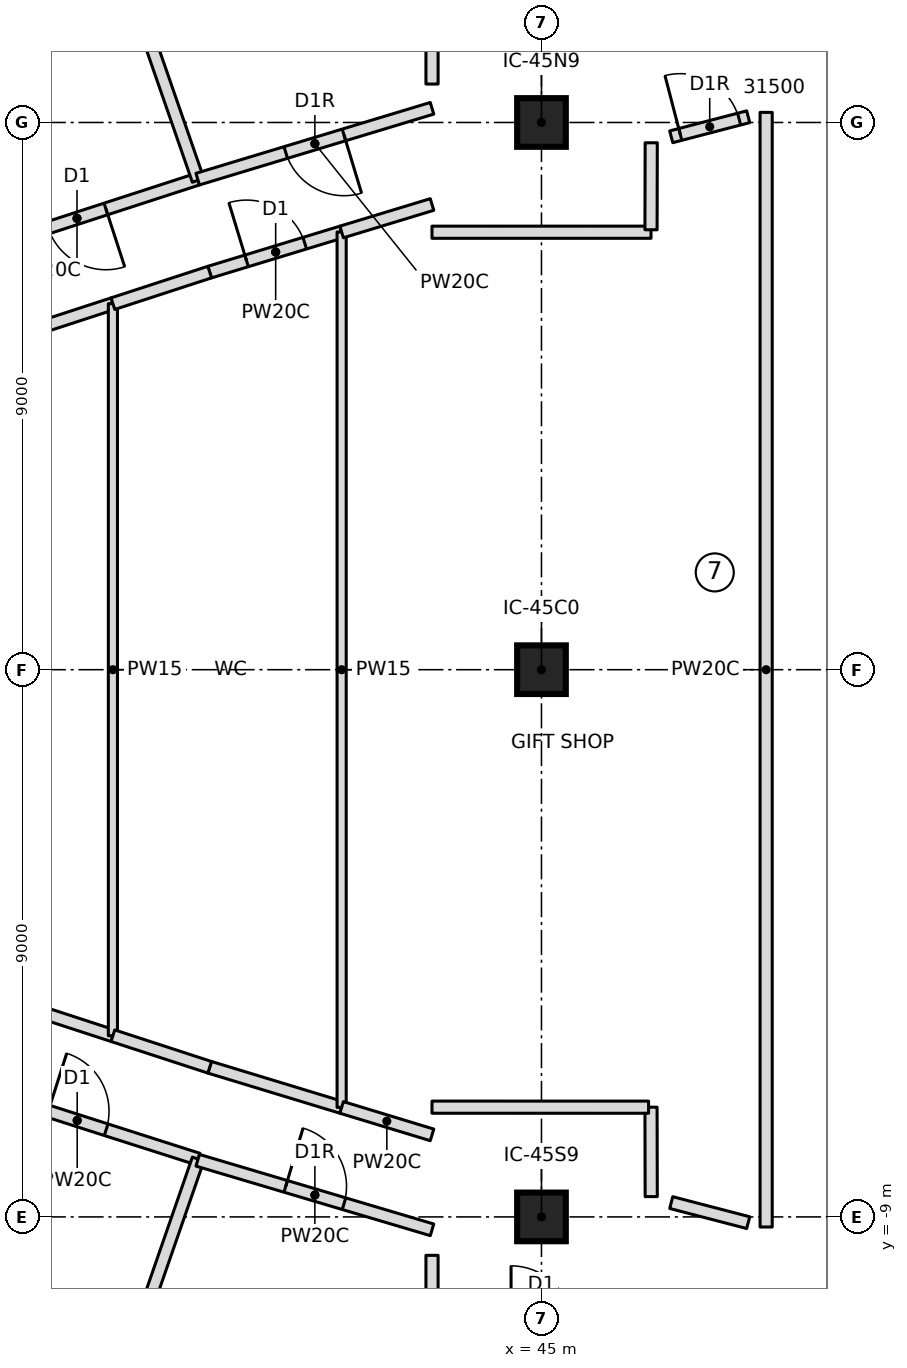
"""IFC4 building model, lengths in metres.
Left out: names, types, materials, properties, quantities, classifications, styles, units other than length and angle.
Written with IfcOpenShell. Run it as: python <this file> out.ifc"""

import sys

from ifc_helpers import new_model, si_unit, direction, frame, frame_2d, origin, origin_2d, place, context, subcontext, project, spatial, rectangle, extrude, element, fill, save


model = new_model("IFC4")
c1 = context("Model", 3, precision=1e-05, world=origin(), true_north=direction((0.0, 1.0)))
c2 = subcontext(c1, "Body", "Model", "MODEL_VIEW")
j1 = project(units=[si_unit("LENGTHUNIT", "METRE"), si_unit("PLANEANGLEUNIT", "RADIAN")], contexts=[c1])
p1 = place(None, origin())
s1 = spatial("IfcSite", under=j1, at=p1, CompositionType="ELEMENT")
p2 = place(p1, origin())
s2 = spatial("IfcBuilding", under=s1, at=p2, CompositionType="ELEMENT")
p3 = place(p2, frame((0.0, 0.0, 308.6)))
s3 = spatial("IfcBuildingStorey", under=s2, at=p3, CompositionType="ELEMENT", Elevation=308.6)
for number, where, z_axis, x_axis in (
    (1, (45.0, -9.0, 0.0), (0.0, 0.0, 1.0), (1.0, 0.0, 0.0)),
    (2, (45.0, 0.0, 0.0), (0.0, 0.0, 1.0), (1.0, 0.0, 0.0)),
    (3, (45.0, 9.0, 0.0), (0.0, 0.0, 1.0), (1.0, 0.0, 0.0)),
):
    element("IfcColumn", number, at=place(p3, frame(where, z_axis=z_axis, x_axis=x_axis)), inside=s3, PredefinedType="COLUMN", context=c2, shape_type="SweptSolid", body=[
        extrude(rectangle(XDim=0.8, YDim=0.8, at=origin_2d()), origin(), (0.0, 0.0, 1.0), 4.6),
    ])
p4 = place(p3, frame((39.347, 8.068, 0.0), z_axis=(0.0, 0.0, 1.0), x_axis=(-0.951104948213, -0.308867896493, 0.0)))
e4 = element("IfcWall", 4, at=p4, inside=s3, PredefinedType="PARTITIONING", context=c2, shape_type="SweptSolid", body=[
    extrude(rectangle(XDim=4.175, YDim=0.2, at=frame_2d((2.087, 0.0))), origin(), (0.0, 0.0, 1.0), 4.3),
])
p5 = place(p4, frame((1.588, 0.0, 0.0)))
e5 = element("IfcOpeningElement", 5, at=p5, cuts=e4, PredefinedType="OPENING", context=c2, shape_type="SweptSolid", body=[
    extrude(rectangle(XDim=1.0, YDim=2.1, at=frame_2d((0.5, 1.05))), frame((0.0, 0.11, 0.0), z_axis=(0.0, -1.0, 0.0), x_axis=(1.0, 0.0, 0.0)), (0.0, 0.0, 1.0), 0.22),
])
p6 = place(p3, frame((39.354, 8.049, 0.0), z_axis=(0.0, 0.0, 1.0), x_axis=(-0.327741126954, 0.944767565967, 0.0)))
e6 = element("IfcWall", 6, at=p6, inside=s3, PredefinedType="PARTITIONING", context=c2, shape_type="SweptSolid", body=[
    extrude(rectangle(XDim=7.606, YDim=0.2, at=frame_2d((3.803, 0.0))), origin(), (0.0, 0.0, 1.0), 4.3),
])
p7 = place(p3, frame((43.2, 9.233, 0.0), z_axis=(0.0, 0.0, 1.0), x_axis=(-0.957187982889, -0.289467036833, 0.0)))
e7 = element("IfcWall", 7, at=p7, inside=s3, PredefinedType="PARTITIONING", context=c2, shape_type="SweptSolid", body=[
    extrude(rectangle(XDim=4.026, YDim=0.2, at=frame_2d((2.013, 0.0))), origin(), (0.0, 0.0, 1.0), 4.3),
])
p8 = place(p7, frame((1.513, 0.0, 0.0)))
e8 = element("IfcOpeningElement", 8, at=p8, cuts=e7, PredefinedType="OPENING", context=c2, shape_type="SweptSolid", body=[
    extrude(rectangle(XDim=1.0, YDim=2.1, at=frame_2d((0.5, 1.05))), frame((0.0, 0.11, 0.0), z_axis=(0.0, -1.0, 0.0), x_axis=(1.0, 0.0, 0.0)), (0.0, 0.0, 1.0), 0.22),
])
p9 = place(p3, frame((35.376, -6.779, 0.0), z_axis=(0.0, 0.0, 1.0), x_axis=(0.952572699992, -0.304311109278, 0.0)))
e9 = element("IfcWall", 9, at=p9, inside=s3, PredefinedType="PARTITIONING", context=c2, shape_type="SweptSolid", body=[
    extrude(rectangle(XDim=4.176, YDim=0.2, at=frame_2d((2.088, 0.0))), origin(), (0.0, 0.0, 1.0), 4.3),
])
p10 = place(p9, frame((1.588, 0.0, 0.0)))
e10 = element("IfcOpeningElement", 10, at=p10, cuts=e9, PredefinedType="OPENING", context=c2, shape_type="SweptSolid", body=[
    extrude(rectangle(XDim=1.0, YDim=2.1, at=frame_2d((0.5, 1.05))), frame((0.0, 0.11, 0.0), z_axis=(0.0, -1.0, 0.0), x_axis=(1.0, 0.0, 0.0)), (0.0, 0.0, 1.0), 0.22),
])
p11 = place(p3, frame((36.861, -15.235, 0.0), z_axis=(0.0, 0.0, 1.0), x_axis=(0.327741126954, 0.944767565967, 0.0)))
e11 = element("IfcWall", 11, at=p11, inside=s3, PredefinedType="PARTITIONING", context=c2, shape_type="SweptSolid", body=[
    extrude(rectangle(XDim=7.606, YDim=0.2, at=frame_2d((3.803, 0.0))), origin(), (0.0, 0.0, 1.0), 4.3),
])
p12 = place(p3, frame((39.347, -8.068, 0.0), z_axis=(0.0, 0.0, 1.0), x_axis=(0.958623301067, -0.284677653938, 0.0)))
e12 = element("IfcWall", 12, at=p12, inside=s3, PredefinedType="PARTITIONING", context=c2, shape_type="SweptSolid", body=[
    extrude(rectangle(XDim=4.02, YDim=0.2, at=frame_2d((2.01, 0.0))), origin(), (0.0, 0.0, 1.0), 4.3),
])
p13 = place(p12, frame((1.51, 0.0, 0.0)))
e13 = element("IfcOpeningElement", 13, at=p13, cuts=e12, PredefinedType="OPENING", context=c2, shape_type="SweptSolid", body=[
    extrude(rectangle(XDim=1.0, YDim=2.1, at=frame_2d((0.5, 1.05))), frame((0.0, 0.11, 0.0), z_axis=(0.0, -1.0, 0.0), x_axis=(1.0, 0.0, 0.0)), (0.0, 0.0, 1.0), 0.22),
])
for number, where, z_axis, x_axis in (
    (14, (35.783, 5.313, 0.0), (0.0, 0.0, 1.0), (0.951, 0.31, 0.0)),
    (15, (37.952, -6.02, 0.0), (0.0, 0.0, 1.0), (-0.951, 0.31, 0.0)),
):
    element("IfcWall", number, at=place(p3, frame(where, z_axis=z_axis, x_axis=x_axis)), inside=s3, PredefinedType="PARTITIONING", context=c2, shape_type="SweptSolid", body=[
        extrude(rectangle(XDim=2.281, YDim=0.2, at=frame_2d((1.14, 0.0))), origin(), (0.0, 0.0, 1.0), 4.3),
    ])
p14 = place(p3, frame((37.952, -6.02, 0.0), z_axis=(0.0, 0.0, 1.0), x_axis=(0.0, 1.0, 0.0)))
e16 = element("IfcWall", 16, at=p14, inside=s3, PredefinedType="PARTITIONING", context=c2, shape_type="SweptSolid", body=[
    extrude(rectangle(XDim=12.04, YDim=0.15, at=frame_2d((6.02, 0.0))), origin(), (0.0, 0.0, 1.0), 4.3),
])
p15 = place(p3, frame((39.544, 6.539, 0.0), z_axis=(0.0, 0.0, 1.0), x_axis=(0.956735130354, 0.290960289981, 0.0)))
e17 = element("IfcWall", 17, at=p15, inside=s3, PredefinedType="PARTITIONING", context=c2, shape_type="SweptSolid", body=[
    extrude(rectangle(XDim=2.268, YDim=0.2, at=frame_2d((1.134, 0.0))), origin(), (0.0, 0.0, 1.0), 4.3),
])
p16 = place(p15, frame((0.634, 0.0, 0.0)))
e18 = element("IfcOpeningElement", 18, at=p16, cuts=e17, PredefinedType="OPENING", context=c2, shape_type="SweptSolid", body=[
    extrude(rectangle(XDim=1.0, YDim=2.1, at=frame_2d((0.5, 1.05))), frame((0.0, 0.11, 0.0), z_axis=(0.0, -1.0, 0.0), x_axis=(1.0, 0.0, 0.0)), (0.0, 0.0, 1.0), 0.22),
])
p17 = place(p3, frame((41.714, -7.199, 0.0), z_axis=(0.0, 0.0, 1.0), x_axis=(-0.956735130354, 0.290960289981, 0.0)))
e19 = element("IfcWall", 19, at=p17, inside=s3, PredefinedType="PARTITIONING", context=c2, shape_type="SweptSolid", body=[
    extrude(rectangle(XDim=2.268, YDim=0.2, at=frame_2d((1.134, 0.0))), origin(), (0.0, 0.0, 1.0), 4.3),
])
for number, where, z_axis, x_axis in (
    (20, (39.544, -6.539, 0.0), (0.0, 0.0, 1.0), (-0.951, 0.31, 0.0)),
    (21, (37.952, 6.02, 0.0), (0.0, 0.0, 1.0), (0.951, 0.31, 0.0)),
):
    element("IfcWall", number, at=place(p3, frame(where, z_axis=z_axis, x_axis=x_axis)), inside=s3, PredefinedType="PARTITIONING", context=c2, shape_type="SweptSolid", body=[
        extrude(rectangle(XDim=1.675, YDim=0.2, at=frame_2d((0.837, 0.0))), origin(), (0.0, 0.0, 1.0), 4.3),
    ])
p18 = place(p3, frame((41.714, -7.199, 0.0), z_axis=(0.0, 0.0, 1.0), x_axis=(0.0, 1.0, 0.0)))
e22 = element("IfcWall", 22, at=p18, inside=s3, PredefinedType="PARTITIONING", context=c2, shape_type="SweptSolid", body=[
    extrude(rectangle(XDim=14.398, YDim=0.15, at=frame_2d((7.199, 0.0))), origin(), (0.0, 0.0, 1.0), 4.3),
])
for number, where, z_axis, x_axis in (
    (23, (43.2, -7.651, 0.0), (0.0, 0.0, 1.0), (-0.957, 0.291, 0.0)),
    (24, (41.714, 7.199, 0.0), (0.0, 0.0, 1.0), (0.957, 0.291, 0.0)),
):
    element("IfcWall", number, at=place(p3, frame(where, z_axis=z_axis, x_axis=x_axis)), inside=s3, PredefinedType="PARTITIONING", context=c2, shape_type="SweptSolid", body=[
        extrude(rectangle(XDim=1.553, YDim=0.2, at=frame_2d((0.777, 0.0))), origin(), (0.0, 0.0, 1.0), 4.3),
    ])
p19 = place(p3, frame((47.134, 8.764, 0.0), z_axis=(0.0, 0.0, 1.0), x_axis=(0.967678694968, 0.252186326563, 0.0)))
e25 = element("IfcWall", 25, at=p19, inside=s3, PredefinedType="PARTITIONING", context=c2, shape_type="SweptSolid", body=[
    extrude(rectangle(XDim=1.308, YDim=0.2, at=frame_2d((0.654, 0.0))), origin(), (0.0, 0.0, 1.0), 4.3),
])
p20 = place(p19, frame((0.154, 0.0, 0.0)))
e26 = element("IfcOpeningElement", 26, at=p20, cuts=e25, PredefinedType="OPENING", context=c2, shape_type="SweptSolid", body=[
    extrude(rectangle(XDim=1.0, YDim=2.1, at=frame_2d((0.5, 1.05))), frame((0.0, 0.11, 0.0), z_axis=(0.0, -1.0, 0.0), x_axis=(1.0, 0.0, 0.0)), (0.0, 0.0, 1.0), 0.22),
])
p21 = place(p3, frame((48.4, -9.094, 0.0), z_axis=(0.0, 0.0, 1.0), x_axis=(-0.967678694968, 0.252186326563, 0.0)))
e27 = element("IfcWall", 27, at=p21, inside=s3, PredefinedType="PARTITIONING", context=c2, shape_type="SweptSolid", body=[
    extrude(rectangle(XDim=1.308, YDim=0.2, at=frame_2d((0.654, 0.0))), origin(), (0.0, 0.0, 1.0), 4.3),
])
p22 = place(p3, frame((43.199, 7.195, 0.0), z_axis=(0.0, 0.0, 1.0), x_axis=(0.999999997703, 6.7778229e-05, 0.0)))
e28 = element("IfcWall", 28, at=p22, inside=s3, PredefinedType="PARTITIONING", context=c2, shape_type="SweptSolid", body=[
    extrude(rectangle(XDim=3.602, YDim=0.2, at=frame_2d((1.801, 0.0))), origin(), (0.0, 0.0, 1.0), 4.3),
])
p23 = place(p3, frame((46.802, 7.235, 0.0), z_axis=(0.0, 0.0, 1.0), x_axis=(0.00238825658, 0.999997148111, 0.0)))
e29 = element("IfcWall", 29, at=p23, inside=s3, PredefinedType="PARTITIONING", context=c2, shape_type="SweptSolid", body=[
    extrude(rectangle(XDim=1.431, YDim=0.2, at=frame_2d((0.716, 0.0))), origin(), (0.0, 0.0, 1.0), 4.3),
])
p24 = place(p3, frame((48.695, 9.166, 0.0), z_axis=(0.0, 0.0, 1.0), x_axis=(0.0, -1.0, 0.0)))
e30 = element("IfcWall", 30, at=p24, inside=s3, PredefinedType="PARTITIONING", context=c2, shape_type="SweptSolid", body=[
    extrude(rectangle(XDim=18.332, YDim=0.2, at=frame_2d((9.166, 0.0))), origin(), (0.0, 0.0, 1.0), 4.3),
])
p25 = place(p3, frame((46.805, -8.666, 0.0), z_axis=(0.0, 0.0, 1.0), x_axis=(-0.002323645179, 0.999997300333, 0.0)))
e31 = element("IfcWall", 31, at=p25, inside=s3, PredefinedType="PARTITIONING", context=c2, shape_type="SweptSolid", body=[
    extrude(rectangle(XDim=1.471, YDim=0.2, at=frame_2d((0.735, 0.0))), origin(), (0.0, 0.0, 1.0), 4.3),
])
p26 = place(p3, frame((46.761, -7.195, 0.0), z_axis=(0.0, 0.0, 1.0), x_axis=(-0.999999997651, 6.8540096e-05, 0.0)))
e32 = element("IfcWall", 32, at=p26, inside=s3, PredefinedType="PARTITIONING", context=c2, shape_type="SweptSolid", body=[
    extrude(rectangle(XDim=3.562, YDim=0.2, at=frame_2d((1.781, 0.0))), origin(), (0.0, 0.0, 1.0), 4.3),
])
for number, where, z_axis, x_axis in (
    (33, (43.2, 9.632, 0.0), (0.0, 0.0, 1.0), (0.0, 1.0, 0.0)),
    (34, (43.2, -10.655, 0.0), (0.0, 0.0, 1.0), (0.0, 1.0, 0.0)),
):
    element("IfcWall", number, at=place(p3, frame(where, z_axis=z_axis, x_axis=x_axis)), inside=s3, PredefinedType="PARTITIONING", context=c2, shape_type="SweptSolid", body=[
        extrude(rectangle(XDim=1.023, YDim=0.2, at=frame_2d((0.511, 0.0))), origin(), (0.0, 0.0, 1.0), 4.3),
    ])
p27 = place(p5, origin())
e35 = element("IfcDoor", 35, at=p27, inside=s3, OperationType="SINGLE_SWING_LEFT", PredefinedType="DOOR", context=c2, shape_type="SweptSolid", body=[
    extrude(rectangle(XDim=1.0, YDim=2.1, at=frame_2d((0.5, 1.05))), frame((0.0, 0.025, 0.0), z_axis=(0.0, -1.0, 0.0), x_axis=(1.0, 0.0, 0.0)), (0.0, 0.0, 1.0), 0.05),
])
fill(e5, e35)
p28 = place(p8, origin())
e36 = element("IfcDoor", 36, at=p28, inside=s3, OperationType="SINGLE_SWING_RIGHT", PredefinedType="DOOR", context=c2, shape_type="SweptSolid", body=[
    extrude(rectangle(XDim=1.0, YDim=2.1, at=frame_2d((0.5, 1.05))), frame((0.0, 0.025, 0.0), z_axis=(0.0, -1.0, 0.0), x_axis=(1.0, 0.0, 0.0)), (0.0, 0.0, 1.0), 0.05),
])
fill(e8, e36)
p29 = place(p10, origin())
e37 = element("IfcDoor", 37, at=p29, inside=s3, OperationType="SINGLE_SWING_LEFT", PredefinedType="DOOR", context=c2, shape_type="SweptSolid", body=[
    extrude(rectangle(XDim=1.0, YDim=2.1, at=frame_2d((0.5, 1.05))), frame((0.0, 0.025, 0.0), z_axis=(0.0, -1.0, 0.0), x_axis=(1.0, 0.0, 0.0)), (0.0, 0.0, 1.0), 0.05),
])
fill(e10, e37)
p30 = place(p13, origin())
e38 = element("IfcDoor", 38, at=p30, inside=s3, OperationType="SINGLE_SWING_RIGHT", PredefinedType="DOOR", context=c2, shape_type="SweptSolid", body=[
    extrude(rectangle(XDim=1.0, YDim=2.1, at=frame_2d((0.5, 1.05))), frame((0.0, 0.025, 0.0), z_axis=(0.0, -1.0, 0.0), x_axis=(1.0, 0.0, 0.0)), (0.0, 0.0, 1.0), 0.05),
])
fill(e13, e38)
p31 = place(p16, origin())
e39 = element("IfcDoor", 39, at=p31, inside=s3, OperationType="SINGLE_SWING_LEFT", PredefinedType="DOOR", context=c2, shape_type="SweptSolid", body=[
    extrude(rectangle(XDim=1.0, YDim=2.1, at=frame_2d((0.5, 1.05))), frame((0.0, 0.025, 0.0), z_axis=(0.0, -1.0, 0.0), x_axis=(1.0, 0.0, 0.0)), (0.0, 0.0, 1.0), 0.05),
])
fill(e18, e39)
p32 = place(p20, origin())
e40 = element("IfcDoor", 40, at=p32, inside=s3, OperationType="SINGLE_SWING_RIGHT", PredefinedType="DOOR", context=c2, shape_type="SweptSolid", body=[
    extrude(rectangle(XDim=1.0, YDim=2.1, at=frame_2d((0.5, 1.05))), frame((0.0, 0.025, 0.0), z_axis=(0.0, -1.0, 0.0), x_axis=(1.0, 0.0, 0.0)), (0.0, 0.0, 1.0), 0.05),
])
fill(e26, e40)
save(model, sys.argv[1])
